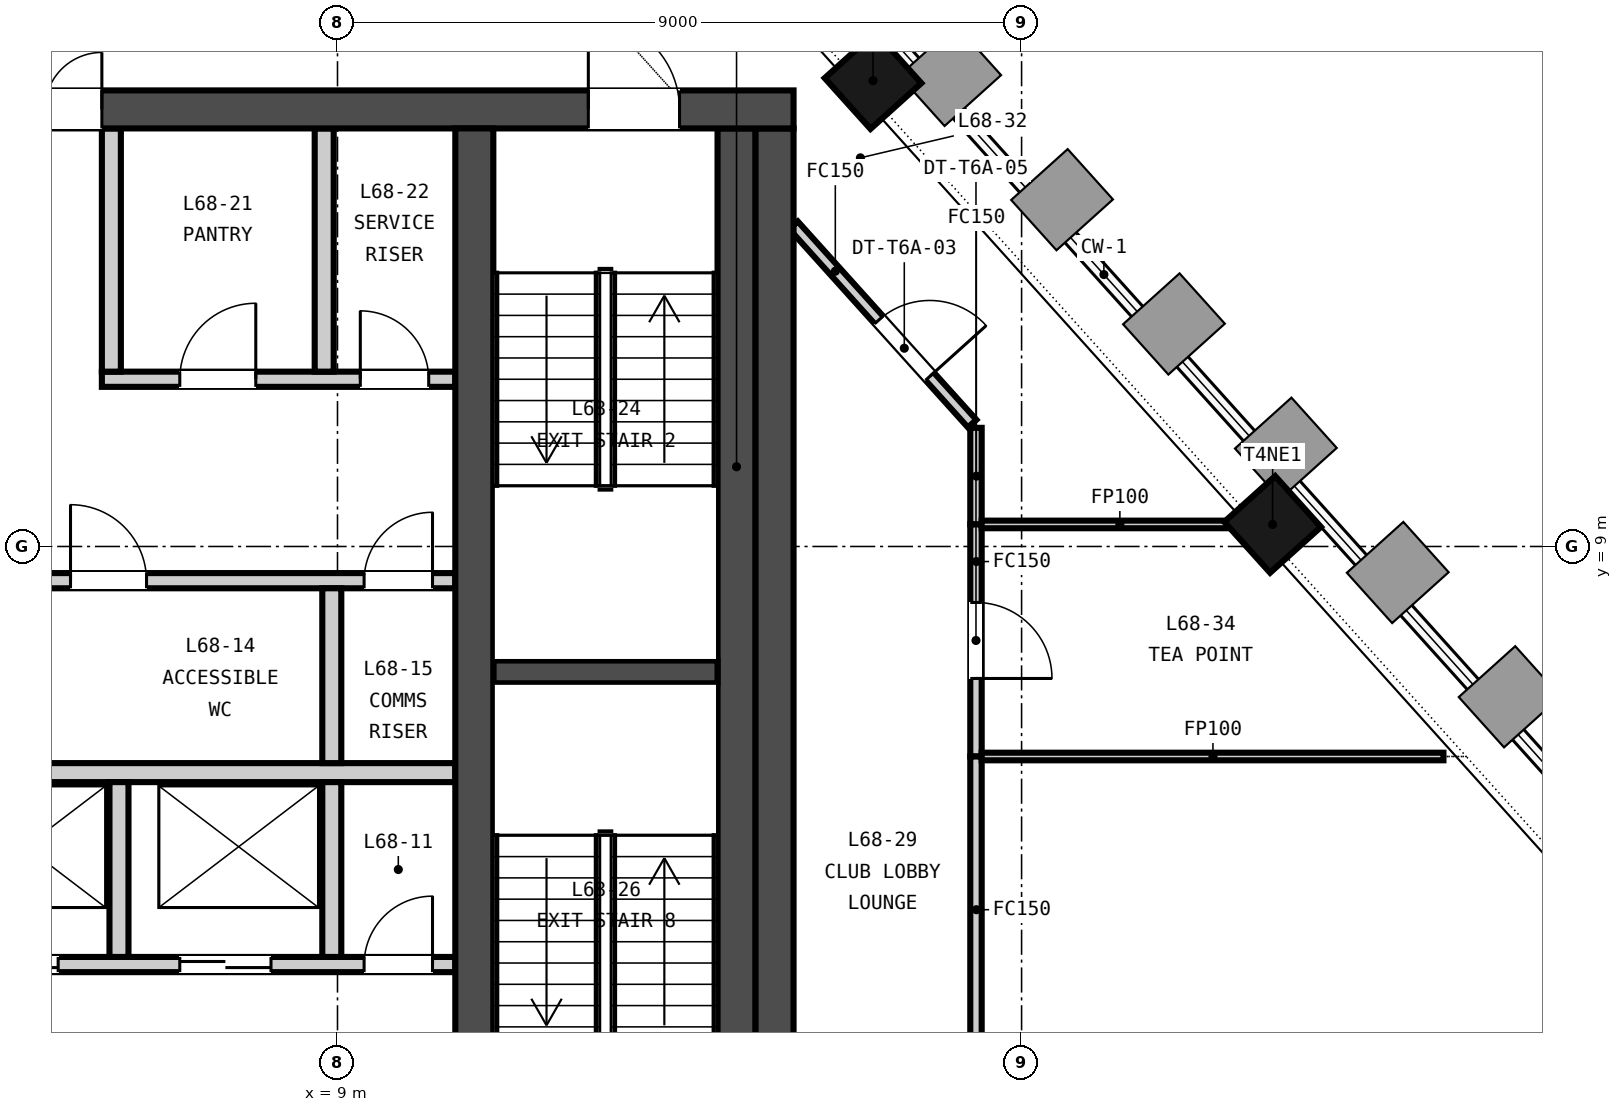
"""IFC4 building model, lengths in metres.
Left out: names, types, materials, properties, quantities, classifications, styles, units other than length and angle.
Written with IfcOpenShell. Run it as: python <this file> out.ifc"""

import sys

from ifc_helpers import new_model, si_unit, direction, frame, frame_2d, origin, origin_2d, place, context, subcontext, project, spatial, rectangle, extrude, element, fill, save


model = new_model("IFC4")
c1 = context("Model", 3, precision=1e-05, world=origin(), true_north=direction((0.0, 1.0)))
c2 = subcontext(c1, "Body", "Model", "MODEL_VIEW")
j1 = project(units=[si_unit("LENGTHUNIT", "METRE"), si_unit("PLANEANGLEUNIT", "RADIAN")], contexts=[c1])
p1 = place(None, origin())
s1 = spatial("IfcSite", under=j1, at=p1, CompositionType="ELEMENT")
p2 = place(p1, origin())
s2 = spatial("IfcBuilding", under=s1, at=p2, CompositionType="ELEMENT")
p3 = place(p2, frame((0.0, 0.0, 268.25)))
s3 = spatial("IfcBuildingStorey", under=s2, at=p3, CompositionType="ELEMENT", Elevation=268.25)
p4 = place(p3, frame((-15.0, 14.75, -0.15), z_axis=(0.0, 0.0, 1.0), x_axis=(1.0, 0.0, 0.0)))
e1 = element("IfcWall", 1, at=p4, inside=s3, PredefinedType="SOLIDWALL", context=c2, shape_type="SweptSolid", body=[
    extrude(rectangle(XDim=30.0, YDim=0.5, at=frame_2d((15.0, 0.0))), origin(), (0.0, 0.0, 1.0), 3.65),
])
p5 = place(p4, frame((9.25, 0.0, 0.15)))
e2 = element("IfcOpeningElement", 2, at=p5, cuts=e1, PredefinedType="OPENING", context=c2, shape_type="SweptSolid", body=[
    extrude(rectangle(XDim=1.5, YDim=2.1, at=frame_2d((0.75, 1.05))), frame((0.0, 0.26, 0.0), z_axis=(0.0, -1.0, 0.0), x_axis=(1.0, 0.0, 0.0)), (0.0, 0.0, 1.0), 0.52),
])
p6 = place(p4, frame((19.4, 0.0, 0.15)))
e3 = element("IfcOpeningElement", 3, at=p6, cuts=e1, PredefinedType="OPENING", context=c2, shape_type="SweptSolid", body=[
    extrude(rectangle(XDim=1.5, YDim=2.1, at=frame_2d((0.75, 1.05))), frame((0.0, 0.26, 0.0), z_axis=(0.0, -1.0, 0.0), x_axis=(1.0, 0.0, 0.0)), (0.0, 0.0, 1.0), 0.52),
])
p7 = place(p4, frame((1.5, 0.0, 0.15)))
e4 = element("IfcOpeningElement", 4, at=p7, cuts=e1, PredefinedType="OPENING", context=c2, shape_type="SweptSolid", body=[
    extrude(rectangle(XDim=1.2, YDim=2.1, at=frame_2d((0.6, 1.05))), frame((0.0, 0.26, 0.0), z_axis=(0.0, -1.0, 0.0), x_axis=(1.0, 0.0, 0.0)), (0.0, 0.0, 1.0), 0.52),
])
p8 = place(p4, frame((27.3, 0.0, 0.15)))
e5 = element("IfcOpeningElement", 5, at=p8, cuts=e1, PredefinedType="OPENING", context=c2, shape_type="SweptSolid", body=[
    extrude(rectangle(XDim=1.2, YDim=2.1, at=frame_2d((0.6, 1.05))), frame((0.0, 0.26, 0.0), z_axis=(0.0, -1.0, 0.0), x_axis=(1.0, 0.0, 0.0)), (0.0, 0.0, 1.0), 0.52),
])
for number, where, z_axis, x_axis in (
    (6, (14.75, 0.5, -0.15), (0.0, 0.0, 1.0), (0.0, 1.0, 0.0)),
    (7, (10.8, 0.5, -0.15), (0.0, 0.0, 1.0), (0.0, 1.0, 0.0)),
):
    element("IfcWall", number, at=place(p3, frame(where, z_axis=z_axis, x_axis=x_axis)), inside=s3, PredefinedType="SOLIDWALL", context=c2, shape_type="SweptSolid", body=[
        extrude(rectangle(XDim=14.0, YDim=0.5, at=frame_2d((7.0, 0.0))), origin(), (0.0, 0.0, 1.0), 3.65),
    ])
for number, where, z_axis, x_axis in (
    (8, (21.303, 9.29, -0.15), (0.0, 0.0, 1.0), (-0.669, 0.743, 0.0)),
    (9, (16.045, 15.129, -0.15), (0.0, 0.0, 1.0), (-0.669, 0.743, 0.0)),
):
    element("IfcColumn", number, at=place(p3, frame(where, z_axis=z_axis, x_axis=x_axis)), inside=s3, PredefinedType="COLUMN", context=c2, shape_type="SweptSolid", body=[
        extrude(rectangle(XDim=0.9, YDim=0.9, at=origin_2d()), origin(), (0.0, 0.0, 1.0), 3.65),
    ])
p9 = place(p3, frame((-10.55, 3.5, 0.0), z_axis=(0.0, 0.0, 1.0), x_axis=(1.0, 0.0, 0.0)))
e10 = element("IfcWall", 10, at=p9, inside=s3, PredefinedType="PARTITIONING", context=c2, shape_type="SweptSolid", body=[
    extrude(rectangle(XDim=21.1, YDim=0.2, at=frame_2d((10.55, 0.0))), origin(), (0.0, 0.0, 1.0), 3.5),
])
p10 = place(p9, frame((0.675, 0.0, 0.0)))
e11 = element("IfcOpeningElement", 11, at=p10, cuts=e10, PredefinedType="OPENING", context=c2, shape_type="SweptSolid", body=[
    extrude(rectangle(XDim=1.2, YDim=2.1, at=frame_2d((0.6, 1.05))), frame((0.0, 0.11, 0.0), z_axis=(0.0, -1.0, 0.0), x_axis=(1.0, 0.0, 0.0)), (0.0, 0.0, 1.0), 0.22),
])
p11 = place(p9, frame((3.475, 0.0, 0.0)))
e12 = element("IfcOpeningElement", 12, at=p11, cuts=e10, PredefinedType="OPENING", context=c2, shape_type="SweptSolid", body=[
    extrude(rectangle(XDim=1.2, YDim=2.1, at=frame_2d((0.6, 1.05))), frame((0.0, 0.11, 0.0), z_axis=(0.0, -1.0, 0.0), x_axis=(1.0, 0.0, 0.0)), (0.0, 0.0, 1.0), 0.22),
])
p12 = place(p9, frame((6.275, 0.0, 0.0)))
e13 = element("IfcOpeningElement", 13, at=p12, cuts=e10, PredefinedType="OPENING", context=c2, shape_type="SweptSolid", body=[
    extrude(rectangle(XDim=1.2, YDim=2.1, at=frame_2d((0.6, 1.05))), frame((0.0, 0.11, 0.0), z_axis=(0.0, -1.0, 0.0), x_axis=(1.0, 0.0, 0.0)), (0.0, 0.0, 1.0), 0.22),
])
p13 = place(p9, frame((9.075, 0.0, 0.0)))
e14 = element("IfcOpeningElement", 14, at=p13, cuts=e10, PredefinedType="OPENING", context=c2, shape_type="SweptSolid", body=[
    extrude(rectangle(XDim=1.2, YDim=2.1, at=frame_2d((0.6, 1.05))), frame((0.0, 0.11, 0.0), z_axis=(0.0, -1.0, 0.0), x_axis=(1.0, 0.0, 0.0)), (0.0, 0.0, 1.0), 0.22),
])
p14 = place(p9, frame((11.875, 0.0, 0.0)))
e15 = element("IfcOpeningElement", 15, at=p14, cuts=e10, PredefinedType="OPENING", context=c2, shape_type="SweptSolid", body=[
    extrude(rectangle(XDim=1.2, YDim=2.1, at=frame_2d((0.6, 1.05))), frame((0.0, 0.11, 0.0), z_axis=(0.0, -1.0, 0.0), x_axis=(1.0, 0.0, 0.0)), (0.0, 0.0, 1.0), 0.22),
])
p15 = place(p9, frame((14.675, 0.0, 0.0)))
e16 = element("IfcOpeningElement", 16, at=p15, cuts=e10, PredefinedType="OPENING", context=c2, shape_type="SweptSolid", body=[
    extrude(rectangle(XDim=1.2, YDim=2.1, at=frame_2d((0.6, 1.05))), frame((0.0, 0.11, 0.0), z_axis=(0.0, -1.0, 0.0), x_axis=(1.0, 0.0, 0.0)), (0.0, 0.0, 1.0), 0.22),
])
p16 = place(p9, frame((17.475, 0.0, 0.0)))
e17 = element("IfcOpeningElement", 17, at=p16, cuts=e10, PredefinedType="OPENING", context=c2, shape_type="SweptSolid", body=[
    extrude(rectangle(XDim=1.2, YDim=2.1, at=frame_2d((0.6, 1.05))), frame((0.0, 0.11, 0.0), z_axis=(0.0, -1.0, 0.0), x_axis=(1.0, 0.0, 0.0)), (0.0, 0.0, 1.0), 0.22),
])
p17 = place(p9, frame((19.9, 0.0, 0.0)))
e18 = element("IfcOpeningElement", 18, at=p17, cuts=e10, PredefinedType="OPENING", context=c2, shape_type="SweptSolid", body=[
    extrude(rectangle(XDim=0.9, YDim=2.1, at=frame_2d((0.45, 1.05))), frame((0.0, 0.11, 0.0), z_axis=(0.0, -1.0, 0.0), x_axis=(1.0, 0.0, 0.0)), (0.0, 0.0, 1.0), 0.22),
])
p18 = place(p3, frame((-10.55, 6.025, 0.0), z_axis=(0.0, 0.0, 1.0), x_axis=(1.0, 0.0, 0.0)))
e19 = element("IfcWall", 19, at=p18, inside=s3, PredefinedType="PARTITIONING", context=c2, shape_type="SweptSolid", body=[
    extrude(rectangle(XDim=21.1, YDim=0.25, at=frame_2d((10.55, 0.0))), origin(), (0.0, 0.0, 1.0), 3.5),
])
p19 = place(p3, frame((-4.125, 8.55, 0.0), z_axis=(0.0, 0.0, 1.0), x_axis=(1.0, 0.0, 0.0)))
e20 = element("IfcWall", 20, at=p19, inside=s3, PredefinedType="PARTITIONING", context=c2, shape_type="SweptSolid", body=[
    extrude(rectangle(XDim=14.675, YDim=0.2, at=frame_2d((7.337, 0.0))), origin(), (0.0, 0.0, 1.0), 3.5),
])
p20 = place(p19, frame((1.413, 0.0, 0.0)))
e21 = element("IfcOpeningElement", 21, at=p20, cuts=e20, PredefinedType="OPENING", context=c2, shape_type="SweptSolid", body=[
    extrude(rectangle(XDim=1.0, YDim=2.1, at=frame_2d((0.5, 1.05))), frame((0.0, 0.11, 0.0), z_axis=(0.0, -1.0, 0.0), x_axis=(1.0, 0.0, 0.0)), (0.0, 0.0, 1.0), 0.22),
])
p21 = place(p19, frame((5.0, 0.0, 0.0)))
e22 = element("IfcOpeningElement", 22, at=p21, cuts=e20, PredefinedType="OPENING", context=c2, shape_type="SweptSolid", body=[
    extrude(rectangle(XDim=1.0, YDim=2.1, at=frame_2d((0.5, 1.05))), frame((0.0, 0.11, 0.0), z_axis=(0.0, -1.0, 0.0), x_axis=(1.0, 0.0, 0.0)), (0.0, 0.0, 1.0), 0.22),
])
p22 = place(p19, frame((9.613, 0.0, 0.0)))
e23 = element("IfcOpeningElement", 23, at=p22, cuts=e20, PredefinedType="OPENING", context=c2, shape_type="SweptSolid", body=[
    extrude(rectangle(XDim=1.0, YDim=2.1, at=frame_2d((0.5, 1.05))), frame((0.0, 0.11, 0.0), z_axis=(0.0, -1.0, 0.0), x_axis=(1.0, 0.0, 0.0)), (0.0, 0.0, 1.0), 0.22),
])
p23 = place(p19, frame((13.475, 0.0, 0.0)))
e24 = element("IfcOpeningElement", 24, at=p23, cuts=e20, PredefinedType="OPENING", context=c2, shape_type="SweptSolid", body=[
    extrude(rectangle(XDim=0.9, YDim=2.1, at=frame_2d((0.45, 1.05))), frame((0.0, 0.11, 0.0), z_axis=(0.0, -1.0, 0.0), x_axis=(1.0, 0.0, 0.0)), (0.0, 0.0, 1.0), 0.22),
])
p24 = place(p3, frame((5.9, 11.2, 0.0), z_axis=(0.0, 0.0, 1.0), x_axis=(1.0, 0.0, 0.0)))
e25 = element("IfcWall", 25, at=p24, inside=s3, PredefinedType="PARTITIONING", context=c2, shape_type="SweptSolid", body=[
    extrude(rectangle(XDim=4.65, YDim=0.2, at=frame_2d((2.325, 0.0))), origin(), (0.0, 0.0, 1.0), 3.5),
])
p25 = place(p24, frame((1.025, 0.0, 0.0)))
e26 = element("IfcOpeningElement", 26, at=p25, cuts=e25, PredefinedType="OPENING", context=c2, shape_type="SweptSolid", body=[
    extrude(rectangle(XDim=1.0, YDim=2.1, at=frame_2d((0.5, 1.05))), frame((0.0, 0.11, 0.0), z_axis=(0.0, -1.0, 0.0), x_axis=(1.0, 0.0, 0.0)), (0.0, 0.0, 1.0), 0.22),
])
p26 = place(p24, frame((3.4, 0.0, 0.0)))
e27 = element("IfcOpeningElement", 27, at=p26, cuts=e25, PredefinedType="OPENING", context=c2, shape_type="SweptSolid", body=[
    extrude(rectangle(XDim=0.9, YDim=2.1, at=frame_2d((0.45, 1.05))), frame((0.0, 0.11, 0.0), z_axis=(0.0, -1.0, 0.0), x_axis=(1.0, 0.0, 0.0)), (0.0, 0.0, 1.0), 0.22),
])
for number, where, z_axis, x_axis in (
    (28, (6.125, 3.6, 0.0), (0.0, 0.0, 1.0), (0.0, 1.0, 0.0)),
    (29, (8.925, 3.6, 0.0), (0.0, 0.0, 1.0), (0.0, 1.0, 0.0)),
):
    element("IfcWall", number, at=place(p3, frame(where, z_axis=z_axis, x_axis=x_axis)), inside=s3, PredefinedType="PARTITIONING", context=c2, shape_type="SweptSolid", body=[
        extrude(rectangle(XDim=2.3, YDim=0.25, at=frame_2d((1.15, 0.0))), origin(), (0.0, 0.0, 1.0), 3.5),
    ])
p27 = place(p3, frame((8.925, 6.15, 0.0), z_axis=(0.0, 0.0, 1.0), x_axis=(0.0, 1.0, 0.0)))
e30 = element("IfcWall", 30, at=p27, inside=s3, PredefinedType="PARTITIONING", context=c2, shape_type="SweptSolid", body=[
    extrude(rectangle(XDim=2.3, YDim=0.25, at=frame_2d((1.15, 0.0))), origin(), (0.0, 0.0, 1.0), 3.5),
])
for number, where, z_axis, x_axis in (
    (31, (6.025, 11.3, 0.0), (0.0, 0.0, 1.0), (0.0, 1.0, 0.0)),
    (32, (8.825, 11.3, 0.0), (0.0, 0.0, 1.0), (0.0, 1.0, 0.0)),
):
    element("IfcWall", number, at=place(p3, frame(where, z_axis=z_axis, x_axis=x_axis)), inside=s3, PredefinedType="PARTITIONING", context=c2, shape_type="SweptSolid", body=[
        extrude(rectangle(XDim=3.2, YDim=0.25, at=frame_2d((1.6, 0.0))), origin(), (0.0, 0.0, 1.0), 3.5),
    ])
p28 = place(p3, frame((11.05, 7.35, 0.0), z_axis=(0.0, 0.0, 1.0), x_axis=(1.0, 0.0, 0.0)))
e33 = element("IfcWall", 33, at=p28, inside=s3, PredefinedType="SOLIDWALL", context=c2, shape_type="SweptSolid", body=[
    extrude(rectangle(XDim=2.95, YDim=0.3, at=frame_2d((1.475, 0.0))), origin(), (0.0, 0.0, 1.0), 3.5),
])
p29 = place(p3, frame((14.25, 0.5, 0.0), z_axis=(0.0, 0.0, 1.0), x_axis=(0.0, 1.0, 0.0)))
e34 = element("IfcWall", 34, at=p29, inside=s3, PredefinedType="SOLIDWALL", context=c2, shape_type="SweptSolid", body=[
    extrude(rectangle(XDim=14.0, YDim=0.5, at=frame_2d((7.0, 0.0))), origin(), (0.0, 0.0, 1.0), 3.5),
])
p30 = place(p3, frame((17.4, 10.561, 0.0), z_axis=(0.0, 0.0, 1.0), x_axis=(0.0, -1.0, 0.0)))
e35 = element("IfcWall", 35, at=p30, inside=s3, PredefinedType="PARTITIONING", context=c2, shape_type="SweptSolid", body=[
    extrude(rectangle(XDim=1.271, YDim=0.15, at=frame_2d((0.635, 0.0))), origin(), (0.0, 0.0, 1.0), 2.751),
])
p31 = place(p3, frame((17.4, 9.29, 0.0), z_axis=(0.0, 0.0, 1.0), x_axis=(0.0, -1.0, 0.0)))
e36 = element("IfcWall", 36, at=p31, inside=s3, PredefinedType="PARTITIONING", context=c2, shape_type="SweptSolid", body=[
    extrude(rectangle(XDim=3.053, YDim=0.15, at=frame_2d((1.526, 0.0))), origin(), (0.0, 0.0, 1.0), 2.751),
])
p32 = place(p31, frame((1.027, 0.0, 0.0)))
e37 = element("IfcOpeningElement", 37, at=p32, cuts=e36, PredefinedType="OPENING", context=c2, shape_type="SweptSolid", body=[
    extrude(rectangle(XDim=1.0, YDim=2.1, at=frame_2d((0.5, 1.05))), frame((0.0, 0.085, 0.0), z_axis=(0.0, -1.0, 0.0), x_axis=(1.0, 0.0, 0.0)), (0.0, 0.0, 1.0), 0.17),
])
p33 = place(p3, frame((17.4, 6.237, 0.0), z_axis=(0.0, 0.0, 1.0), x_axis=(0.0, -1.0, 0.0)))
e38 = element("IfcWall", 38, at=p33, inside=s3, PredefinedType="PARTITIONING", context=c2, shape_type="SweptSolid", body=[
    extrude(rectangle(XDim=9.162, YDim=0.15, at=frame_2d((4.581, 0.0))), origin(), (0.0, 0.0, 1.0), 2.751),
])
p34 = place(p33, frame((4.081, 0.0, 0.0)))
e39 = element("IfcOpeningElement", 39, at=p34, cuts=e38, PredefinedType="OPENING", context=c2, shape_type="SweptSolid", body=[
    extrude(rectangle(XDim=1.0, YDim=2.1, at=frame_2d((0.5, 1.05))), frame((0.0, 0.085, 0.0), z_axis=(0.0, -1.0, 0.0), x_axis=(1.0, 0.0, 0.0)), (0.0, 0.0, 1.0), 0.17),
])
p35 = place(p3, frame((15.0, 13.226, 0.0), z_axis=(0.0, 0.0, 1.0), x_axis=(0.669187491984, -0.743093601488, 0.0)))
e40 = element("IfcWall", 40, at=p35, inside=s3, PredefinedType="PARTITIONING", context=c2, shape_type="SweptSolid", body=[
    extrude(rectangle(XDim=3.511, YDim=0.15, at=frame_2d((1.756, 0.0))), origin(), (0.0, 0.0, 1.0), 2.751),
])
p36 = place(p35, frame((1.677, 0.0, 0.0)))
e41 = element("IfcOpeningElement", 41, at=p36, cuts=e40, PredefinedType="OPENING", context=c2, shape_type="SweptSolid", body=[
    extrude(rectangle(XDim=1.0, YDim=2.1, at=frame_2d((0.5, 1.05))), frame((0.0, 0.085, 0.0), z_axis=(0.0, -1.0, 0.0), x_axis=(1.0, 0.0, 0.0)), (0.0, 0.0, 1.0), 0.17),
])
p37 = place(p3, frame((17.475, 9.29, 0.0), z_axis=(0.0, 0.0, 1.0), x_axis=(1.0, 0.0, 0.0)))
e42 = element("IfcWall", 42, at=p37, inside=s3, PredefinedType="PARTITIONING", context=c2, shape_type="SweptSolid", body=[
    extrude(rectangle(XDim=3.626, YDim=0.1, at=frame_2d((1.813, 0.0))), origin(), (0.0, 0.0, 1.0), 2.751),
])
p38 = place(p3, frame((17.475, 6.237, 0.0), z_axis=(0.0, 0.0, 1.0), x_axis=(1.0, 0.0, 0.0)))
e43 = element("IfcWall", 43, at=p38, inside=s3, PredefinedType="PARTITIONING", context=c2, shape_type="SweptSolid", body=[
    extrude(rectangle(XDim=6.075, YDim=0.1, at=frame_2d((3.038, 0.0))), origin(), (0.0, 0.0, 1.0), 2.751),
])
p39 = place(p15, origin())
e44 = element("IfcDoor", 44, at=p39, inside=s3, OperationType="DOUBLE_DOOR_SLIDING", PredefinedType="DOOR", context=c2, shape_type="SweptSolid", body=[
    extrude(rectangle(XDim=1.2, YDim=2.1, at=frame_2d((0.6, 1.05))), frame((0.0, 0.025, 0.0), z_axis=(0.0, -1.0, 0.0), x_axis=(1.0, 0.0, 0.0)), (0.0, 0.0, 1.0), 0.05),
])
fill(e16, e44)
p40 = place(p16, origin())
e45 = element("IfcDoor", 45, at=p40, inside=s3, OperationType="DOUBLE_DOOR_SLIDING", PredefinedType="DOOR", context=c2, shape_type="SweptSolid", body=[
    extrude(rectangle(XDim=1.2, YDim=2.1, at=frame_2d((0.6, 1.05))), frame((0.0, 0.025, 0.0), z_axis=(0.0, -1.0, 0.0), x_axis=(1.0, 0.0, 0.0)), (0.0, 0.0, 1.0), 0.05),
])
fill(e17, e45)
p41 = place(p17, origin())
e46 = element("IfcDoor", 46, at=p41, inside=s3, OperationType="SINGLE_SWING_RIGHT", PredefinedType="DOOR", context=c2, shape_type="SweptSolid", body=[
    extrude(rectangle(XDim=0.9, YDim=2.1, at=frame_2d((0.45, 1.05))), frame((0.0, 0.025, 0.0), z_axis=(0.0, -1.0, 0.0), x_axis=(1.0, 0.0, 0.0)), (0.0, 0.0, 1.0), 0.05),
])
fill(e18, e46)
p42 = place(p22, origin())
e47 = element("IfcDoor", 47, at=p42, inside=s3, OperationType="SINGLE_SWING_LEFT", PredefinedType="DOOR", context=c2, shape_type="SweptSolid", body=[
    extrude(rectangle(XDim=1.0, YDim=2.1, at=frame_2d((0.5, 1.05))), frame((0.0, 0.025, 0.0), z_axis=(0.0, -1.0, 0.0), x_axis=(1.0, 0.0, 0.0)), (0.0, 0.0, 1.0), 0.05),
])
fill(e23, e47)
p43 = place(p23, origin())
e48 = element("IfcDoor", 48, at=p43, inside=s3, OperationType="SINGLE_SWING_RIGHT", PredefinedType="DOOR", context=c2, shape_type="SweptSolid", body=[
    extrude(rectangle(XDim=0.9, YDim=2.1, at=frame_2d((0.45, 1.05))), frame((0.0, 0.025, 0.0), z_axis=(0.0, -1.0, 0.0), x_axis=(1.0, 0.0, 0.0)), (0.0, 0.0, 1.0), 0.05),
])
fill(e24, e48)
p44 = place(p25, origin())
e49 = element("IfcDoor", 49, at=p44, inside=s3, OperationType="SINGLE_SWING_RIGHT", PredefinedType="DOOR", context=c2, shape_type="SweptSolid", body=[
    extrude(rectangle(XDim=1.0, YDim=2.1, at=frame_2d((0.5, 1.05))), frame((0.0, 0.025, 0.0), z_axis=(0.0, -1.0, 0.0), x_axis=(1.0, 0.0, 0.0)), (0.0, 0.0, 1.0), 0.05),
])
fill(e26, e49)
p45 = place(p26, origin())
e50 = element("IfcDoor", 50, at=p45, inside=s3, OperationType="SINGLE_SWING_LEFT", PredefinedType="DOOR", context=c2, shape_type="SweptSolid", body=[
    extrude(rectangle(XDim=0.9, YDim=2.1, at=frame_2d((0.45, 1.05))), frame((0.0, 0.025, 0.0), z_axis=(0.0, -1.0, 0.0), x_axis=(1.0, 0.0, 0.0)), (0.0, 0.0, 1.0), 0.05),
])
fill(e27, e50)
p46 = place(p6, origin())
e51 = element("IfcDoor", 51, at=p46, inside=s3, OperationType="DOUBLE_DOOR_SINGLE_SWING", PredefinedType="DOOR", context=c2, shape_type="SweptSolid", body=[
    extrude(rectangle(XDim=1.5, YDim=2.1, at=frame_2d((0.75, 1.05))), frame((0.0, 0.025, 0.0), z_axis=(0.0, -1.0, 0.0), x_axis=(1.0, 0.0, 0.0)), (0.0, 0.0, 1.0), 0.05),
])
fill(e3, e51)
p47 = place(p8, origin())
e52 = element("IfcDoor", 52, at=p47, inside=s3, OperationType="SINGLE_SWING_LEFT", PredefinedType="DOOR", context=c2, shape_type="SweptSolid", body=[
    extrude(rectangle(XDim=1.2, YDim=2.1, at=frame_2d((0.6, 1.05))), frame((0.0, 0.025, 0.0), z_axis=(0.0, -1.0, 0.0), x_axis=(1.0, 0.0, 0.0)), (0.0, 0.0, 1.0), 0.05),
])
fill(e5, e52)
p48 = place(p36, origin())
e53 = element("IfcDoor", 53, at=p48, inside=s3, OperationType="SINGLE_SWING_RIGHT", PredefinedType="DOOR", context=c2, shape_type="SweptSolid", body=[
    extrude(rectangle(XDim=1.0, YDim=2.1, at=frame_2d((0.5, 1.05))), frame((0.0, 0.025, 0.0), z_axis=(0.0, -1.0, 0.0), x_axis=(1.0, 0.0, 0.0)), (0.0, 0.0, 1.0), 0.05),
])
fill(e41, e53)
p49 = place(p32, origin())
e54 = element("IfcDoor", 54, at=p49, inside=s3, OperationType="SINGLE_SWING_RIGHT", PredefinedType="DOOR", context=c2, shape_type="SweptSolid", body=[
    extrude(rectangle(XDim=1.0, YDim=2.1, at=frame_2d((0.5, 1.05))), frame((0.0, 0.025, 0.0), z_axis=(0.0, -1.0, 0.0), x_axis=(1.0, 0.0, 0.0)), (0.0, 0.0, 1.0), 0.05),
])
fill(e37, e54)
save(model, sys.argv[1])
